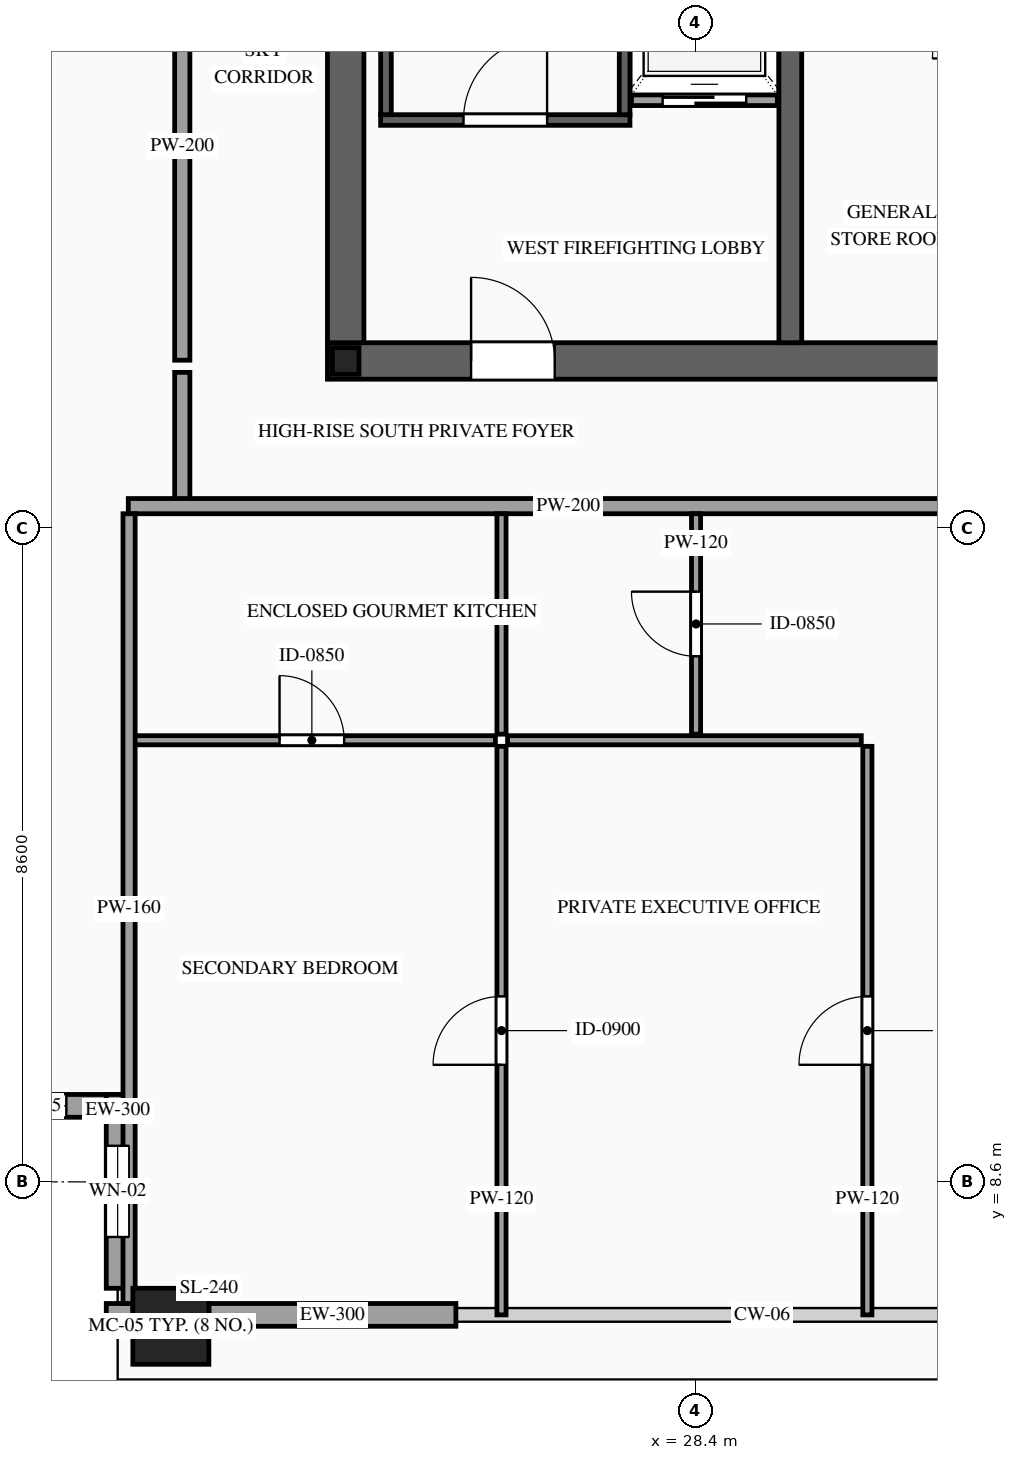
"""IFC4 building model, lengths in metres.
Left out: names, types, materials, properties, quantities, classifications, styles, units other than length and angle.
Written with IfcOpenShell. Run it as: python <this file> out.ifc"""

import sys

from ifc_helpers import new_model, si_unit, direction, frame, frame_2d, origin, origin_2d, place, context, subcontext, project, spatial, rectangle, hollow_rectangle, i_section, extrude, source, transform, mapped, element, fill, save


model = new_model("IFC4")
c1 = context("Model", 3, precision=1e-05, world=origin(), true_north=direction((0.0, 1.0)))
c2 = subcontext(c1, "Body", "Model", "MODEL_VIEW")
j1 = project(units=[si_unit("LENGTHUNIT", "METRE"), si_unit("PLANEANGLEUNIT", "RADIAN")], contexts=[c1])
p1 = place(None, origin())
s1 = spatial("IfcSite", under=j1, at=p1, CompositionType="ELEMENT")
p2 = place(p1, origin())
s2 = spatial("IfcBuilding", under=s1, at=p2, CompositionType="ELEMENT")
p3 = place(p2, frame((0.0, 0.0, 343.2)))
s3 = spatial("IfcBuildingStorey", under=s2, at=p3, CompositionType="ELEMENT", Elevation=343.2)
p4 = place(p3, frame((23.56, 19.4, 0.0), z_axis=(0.0, 0.0, 1.0), x_axis=(1.0, 0.0, 0.0)))
e1 = element("IfcWall", 1, at=p4, inside=s3, PredefinedType="SHEAR", context=c2, shape_type="SweptSolid", body=[
    extrude(rectangle(XDim=26.88, YDim=0.48, at=frame_2d((13.44, 0.0))), origin(), (0.0, 0.0, 1.0), 4.0),
])
p5 = place(p4, frame((1.89, 0.0, 0.0)))
e2 = element("IfcOpeningElement", 2, at=p5, cuts=e1, PredefinedType="OPENING", context=c2, shape_type="SweptSolid", body=[
    extrude(rectangle(XDim=1.1, YDim=2.2, at=frame_2d((0.55, 1.1))), frame((0.0, 0.255, 0.0), z_axis=(0.0, -1.0, 0.0), x_axis=(1.0, 0.0, 0.0)), (0.0, 0.0, 1.0), 0.51),
])
p6 = place(p4, frame((9.79, 0.0, 0.0)))
e3 = element("IfcOpeningElement", 3, at=p6, cuts=e1, PredefinedType="OPENING", context=c2, shape_type="SweptSolid", body=[
    extrude(rectangle(XDim=1.1, YDim=2.2, at=frame_2d((0.55, 1.1))), frame((0.0, 0.255, 0.0), z_axis=(0.0, -1.0, 0.0), x_axis=(1.0, 0.0, 0.0)), (0.0, 0.0, 1.0), 0.51),
])
p7 = place(p4, frame((22.99, 0.0, 0.0)))
e4 = element("IfcOpeningElement", 4, at=p7, cuts=e1, PredefinedType="OPENING", context=c2, shape_type="SweptSolid", body=[
    extrude(rectangle(XDim=1.1, YDim=2.2, at=frame_2d((0.55, 1.1))), frame((0.0, 0.255, 0.0), z_axis=(0.0, -1.0, 0.0), x_axis=(1.0, 0.0, 0.0)), (0.0, 0.0, 1.0), 0.51),
])
p8 = place(p4, frame((19.61, 0.0, 0.0)))
e5 = element("IfcOpeningElement", 5, at=p8, cuts=e1, PredefinedType="OPENING", context=c2, shape_type="SweptSolid", body=[
    extrude(rectangle(XDim=0.9, YDim=2.15, at=frame_2d((0.45, 1.075))), frame((0.0, 0.255, 0.0), z_axis=(0.0, -1.0, 0.0), x_axis=(1.0, 0.0, 0.0)), (0.0, 0.0, 1.0), 0.51),
])
p9 = place(p4, frame((18.17, 0.0, 0.0)))
e6 = element("IfcOpeningElement", 6, at=p9, cuts=e1, PredefinedType="OPENING", context=c2, shape_type="SweptSolid", body=[
    extrude(rectangle(XDim=0.9, YDim=2.15, at=frame_2d((0.45, 1.075))), frame((0.0, 0.255, 0.0), z_axis=(0.0, -1.0, 0.0), x_axis=(1.0, 0.0, 0.0)), (0.0, 0.0, 1.0), 0.51),
])
m1 = source(origin(), c2, "Body", "SweptSolid", [
    extrude(rectangle(XDim=12.32, YDim=0.48, at=frame_2d((6.16, 0.0))), origin(), (0.0, 0.0, 1.0), 4.0),
])
p10 = place(p3, frame((23.8, 19.64, 0.0), z_axis=(0.0, 0.0, 1.0), x_axis=(0.0, 1.0, 0.0)))
e7 = element("IfcWall", 7, at=p10, inside=s3, PredefinedType="SHEAR", context=c2, shape_type="MappedRepresentation", body=[
    mapped(m1, transform((0.0, 0.0, 0.0), scale=1.0)),
])
m2 = source(origin(), c2, "Body", "SweptSolid", [
    extrude(rectangle(XDim=12.32, YDim=0.3, at=frame_2d((6.16, 0.0))), origin(), (0.0, 0.0, 1.0), 4.0),
])
p11 = place(p3, frame((29.65, 19.64, 0.0), z_axis=(0.0, 0.0, 1.0), x_axis=(0.0, 1.0, 0.0)))
e8 = element("IfcWall", 8, at=p11, inside=s3, PredefinedType="SOLIDWALL", context=c2, shape_type="MappedRepresentation", body=[
    mapped(m2, transform((0.0, 0.0, 0.0), scale=1.0)),
])
m3 = source(origin(), c2, "Body", "SweptSolid", [
    extrude(i_section(OverallWidth=0.35, OverallDepth=0.35, WebThickness=0.012, FlangeThickness=0.019, at=origin_2d()), origin(), (0.0, 0.0, 1.0), 4.0),
])
p12 = place(p3, frame((23.8, 19.4, 0.0), z_axis=(0.0, 0.0, 1.0), x_axis=(1.0, 0.0, 0.0)))
e9 = element("IfcColumn", 9, at=p12, inside=s3, PredefinedType="COLUMN", context=c2, shape_type="MappedRepresentation", body=[
    mapped(m3, transform((0.0, 0.0, 0.0), scale=1.0)),
])
m4 = source(origin(), c2, "Body", "SweptSolid", [
    extrude(hollow_rectangle(XDim=1.0, YDim=1.0, WallThickness=0.048, at=origin_2d()), origin(), (0.0, 0.0, 1.0), 4.0),
])
p13 = place(p3, frame((21.5, 6.7, 0.0), z_axis=(0.0, 0.0, 1.0), x_axis=(1.0, 0.0, 0.0)))
e10 = element("IfcColumn", 10, at=p13, inside=s3, PredefinedType="COLUMN", context=c2, shape_type="MappedRepresentation", body=[
    mapped(m4, transform((0.0, 0.0, 0.0), scale=1.0)),
])
p14 = place(p3, frame((18.4, 9.6, 0.0), z_axis=(0.0, 0.0, 1.0), x_axis=(1.0, 0.0, 0.0)))
e11 = element("IfcWall", 11, at=p14, inside=s3, PredefinedType="SOLIDWALL", context=c2, shape_type="SweptSolid", body=[
    extrude(rectangle(XDim=2.55, YDim=0.3, at=frame_2d((1.275, 0.0))), origin(), (0.0, 0.0, 1.0), 3.76),
])
p15 = place(p14, frame((0.825, 0.0, 0.85)))
e12 = element("IfcOpeningElement", 12, at=p15, cuts=e11, PredefinedType="OPENING", context=c2, shape_type="SweptSolid", body=[
    extrude(rectangle(XDim=0.9, YDim=1.5, at=frame_2d((0.45, 0.75))), frame((0.0, 0.165, 0.0), z_axis=(0.0, -1.0, 0.0), x_axis=(1.0, 0.0, 0.0)), (0.0, 0.0, 1.0), 0.33),
])
p16 = place(p3, frame((20.8, 9.75, 0.0), z_axis=(0.0, 0.0, 1.0), x_axis=(0.0, -1.0, 0.0)))
e13 = element("IfcWall", 13, at=p16, inside=s3, PredefinedType="SOLIDWALL", context=c2, shape_type="SweptSolid", body=[
    extrude(rectangle(XDim=2.55, YDim=0.3, at=frame_2d((1.275, 0.0))), origin(), (0.0, 0.0, 1.0), 3.76),
])
p17 = place(p16, frame((0.675, 0.0, 0.85)))
e14 = element("IfcOpeningElement", 14, at=p17, cuts=e13, PredefinedType="OPENING", context=c2, shape_type="SweptSolid", body=[
    extrude(rectangle(XDim=1.2, YDim=2.1, at=frame_2d((0.6, 1.05))), frame((0.0, 0.165, 0.0), z_axis=(0.0, -1.0, 0.0), x_axis=(1.0, 0.0, 0.0)), (0.0, 0.0, 1.0), 0.33),
])
m5 = source(origin(), c2, "Body", "SweptSolid", [
    extrude(rectangle(XDim=0.35, YDim=0.3, at=frame_2d((0.175, 0.0))), origin(), (0.0, 0.0, 1.0), 3.76),
])
p18 = place(p3, frame((20.65, 6.85, 0.0), z_axis=(0.0, 0.0, 1.0), x_axis=(1.0, 0.0, 0.0)))
e15 = element("IfcWall", 15, at=p18, inside=s3, PredefinedType="SOLIDWALL", context=c2, shape_type="MappedRepresentation", body=[
    mapped(m5, transform((0.0, 0.0, 0.0), scale=1.0)),
])
m6 = source(origin(), c2, "Body", "SweptSolid", [
    extrude(rectangle(XDim=3.25, YDim=0.3, at=frame_2d((1.625, 0.0))), origin(), (0.0, 0.0, 1.0), 3.365),
])
p19 = place(p3, frame((22.0, 6.85, 0.0), z_axis=(0.0, 0.0, 1.0), x_axis=(1.0, 0.0, 0.0)))
e16 = element("IfcWall", 16, at=p19, inside=s3, PredefinedType="SOLIDWALL", context=c2, shape_type="MappedRepresentation", body=[
    mapped(m6, transform((0.0, 0.0, 0.0), scale=1.0)),
])
p20 = place(p3, frame((27.56, 22.83, 0.0), z_axis=(0.0, 0.0, 1.0), x_axis=(1.0, 0.0, 0.0)))
e17 = element("IfcWall", 17, at=p20, inside=s3, PredefinedType="SOLIDWALL", context=c2, shape_type="SweptSolid", body=[
    extrude(rectangle(XDim=1.92, YDim=0.14, at=frame_2d((0.96, 0.0))), origin(), (0.0, 0.0, 1.0), 3.76),
])
p21 = place(p20, frame((0.41, 0.0, 0.0)))
e18 = element("IfcOpeningElement", 18, at=p21, cuts=e17, PredefinedType="OPENING", context=c2, shape_type="SweptSolid", body=[
    extrude(rectangle(XDim=1.1, YDim=2.2, at=frame_2d((0.55, 1.1))), frame((0.0, 0.085, 0.0), z_axis=(0.0, -1.0, 0.0), x_axis=(1.0, 0.0, 0.0)), (0.0, 0.0, 1.0), 0.17),
])
p22 = place(p3, frame((24.26, 22.57, 0.0), z_axis=(0.0, 0.0, 1.0), x_axis=(1.0, 0.0, 0.0)))
e19 = element("IfcWall", 19, at=p22, inside=s3, PredefinedType="SOLIDWALL", context=c2, shape_type="SweptSolid", body=[
    extrude(rectangle(XDim=3.28, YDim=0.14, at=frame_2d((1.64, 0.0))), origin(), (0.0, 0.0, 1.0), 3.76),
])
p23 = place(p22, frame((1.09, 0.0, 0.0)))
e20 = element("IfcOpeningElement", 20, at=p23, cuts=e19, PredefinedType="OPENING", context=c2, shape_type="SweptSolid", body=[
    extrude(rectangle(XDim=1.1, YDim=2.2, at=frame_2d((0.55, 1.1))), frame((0.0, 0.085, 0.0), z_axis=(0.0, -1.0, 0.0), x_axis=(1.0, 0.0, 0.0)), (0.0, 0.0, 1.0), 0.17),
])
m7 = source(origin(), c2, "Body", "SweptSolid", [
    extrude(rectangle(XDim=8.94, YDim=0.14, at=frame_2d((4.47, 0.0))), origin(), (0.0, 0.0, 1.0), 3.76),
])
for number, where, z_axis, x_axis in (
    (21, (24.33, 22.64, 0.0), (0.0, 0.0, 1.0), (0.0, 1.0, 0.0)),
    (22, (27.47, 22.64, 0.0), (0.0, 0.0, 1.0), (0.0, 1.0, 0.0)),
):
    element("IfcWall", number, at=place(p3, frame(where, z_axis=z_axis, x_axis=x_axis)), inside=s3, PredefinedType="SOLIDWALL", context=c2, shape_type="MappedRepresentation", body=[
        mapped(m7, transform((0.0, 0.0, 0.0), scale=1.0)),
    ])
m8 = source(origin(), c2, "Body", "SweptSolid", [
    extrude(rectangle(XDim=1.7, YDim=0.2, at=frame_2d((0.85, 0.0))), origin(), (0.0, 0.0, 1.0), 3.76),
])
p24 = place(p3, frame((21.65, 17.55, 0.0), z_axis=(0.0, 0.0, 1.0), x_axis=(0.0, 1.0, 0.0)))
e23 = element("IfcWall", 23, at=p24, inside=s3, PredefinedType="PARTITIONING", context=c2, shape_type="MappedRepresentation", body=[
    mapped(m8, transform((0.0, 0.0, 0.0), scale=1.0)),
])
p25 = place(p3, frame((20.94, 17.49, 0.0), z_axis=(0.0, 0.0, 1.0), x_axis=(1.0, 0.0, 0.0)))
e24 = element("IfcWall", 24, at=p25, inside=s3, PredefinedType="PARTITIONING", context=c2, shape_type="SweptSolid", body=[
    extrude(rectangle(XDim=19.834, YDim=0.2, at=frame_2d((9.917, 0.0))), origin(), (0.0, 0.0, 1.0), 3.76),
])
p26 = place(p25, frame((11.824, 0.0, 0.0)))
e25 = element("IfcOpeningElement", 25, at=p26, cuts=e24, PredefinedType="OPENING", context=c2, shape_type="SweptSolid", body=[
    extrude(rectangle(XDim=1.0, YDim=2.2, at=frame_2d((0.5, 1.1))), frame((0.0, 0.115, 0.0), z_axis=(0.0, -1.0, 0.0), x_axis=(1.0, 0.0, 0.0)), (0.0, 0.0, 1.0), 0.23),
])
p27 = place(p3, frame((20.94, 14.41, 0.0), z_axis=(0.0, 0.0, 1.0), x_axis=(1.0, 0.0, 0.0)))
e26 = element("IfcWall", 26, at=p27, inside=s3, PredefinedType="PARTITIONING", context=c2, shape_type="SweptSolid", body=[
    extrude(rectangle(XDim=4.83, YDim=0.12, at=frame_2d((2.415, 0.0))), origin(), (0.0, 0.0, 1.0), 3.76),
])
p28 = place(p27, frame((1.99, 0.0, 0.0)))
e27 = element("IfcOpeningElement", 27, at=p28, cuts=e26, PredefinedType="OPENING", context=c2, shape_type="SweptSolid", body=[
    extrude(rectangle(XDim=0.85, YDim=2.1, at=frame_2d((0.425, 1.05))), frame((0.0, 0.075, 0.0), z_axis=(0.0, -1.0, 0.0), x_axis=(1.0, 0.0, 0.0)), (0.0, 0.0, 1.0), 0.15),
])
m9 = source(origin(), c2, "Body", "SweptSolid", [
    extrude(rectangle(XDim=2.9, YDim=0.12, at=frame_2d((1.45, 0.0))), origin(), (0.0, 0.0, 1.0), 3.76),
])
p29 = place(p3, frame((25.85, 14.49, 0.0), z_axis=(0.0, 0.0, 1.0), x_axis=(0.0, 1.0, 0.0)))
e28 = element("IfcWall", 28, at=p29, inside=s3, PredefinedType="PARTITIONING", context=c2, shape_type="MappedRepresentation", body=[
    mapped(m9, transform((0.0, 0.0, 0.0), scale=1.0)),
])
p30 = place(p3, frame((28.41, 14.49, 0.0), z_axis=(0.0, 0.0, 1.0), x_axis=(0.0, 1.0, 0.0)))
e29 = element("IfcWall", 29, at=p30, inside=s3, PredefinedType="PARTITIONING", context=c2, shape_type="SweptSolid", body=[
    extrude(rectangle(XDim=2.9, YDim=0.12, at=frame_2d((1.45, 0.0))), origin(), (0.0, 0.0, 1.0), 3.76),
])
p31 = place(p30, frame((1.025, 0.0, 0.0)))
e30 = element("IfcOpeningElement", 30, at=p31, cuts=e29, PredefinedType="OPENING", context=c2, shape_type="SweptSolid", body=[
    extrude(rectangle(XDim=0.85, YDim=2.1, at=frame_2d((0.425, 1.05))), frame((0.0, 0.075, 0.0), z_axis=(0.0, -1.0, 0.0), x_axis=(1.0, 0.0, 0.0)), (0.0, 0.0, 1.0), 0.15),
])
p32 = place(p3, frame((25.85, 6.85, 0.0), z_axis=(0.0, 0.0, 1.0), x_axis=(0.0, 1.0, 0.0)))
e31 = element("IfcWall", 31, at=p32, inside=s3, PredefinedType="PARTITIONING", context=c2, shape_type="SweptSolid", body=[
    extrude(rectangle(XDim=7.48, YDim=0.12, at=frame_2d((3.74, 0.0))), origin(), (0.0, 0.0, 1.0), 3.76),
])
p33 = place(p32, frame((3.29, 0.0, 0.0)))
e32 = element("IfcOpeningElement", 32, at=p33, cuts=e31, PredefinedType="OPENING", context=c2, shape_type="SweptSolid", body=[
    extrude(rectangle(XDim=0.9, YDim=2.15, at=frame_2d((0.45, 1.075))), frame((0.0, 0.075, 0.0), z_axis=(0.0, -1.0, 0.0), x_axis=(1.0, 0.0, 0.0)), (0.0, 0.0, 1.0), 0.15),
])
m10 = source(origin(), c2, "Body", "SweptSolid", [
    extrude(rectangle(XDim=4.654, YDim=0.12, at=frame_2d((2.327, 0.0))), origin(), (0.0, 0.0, 1.0), 3.76),
])
p34 = place(p3, frame((25.93, 14.41, 0.0), z_axis=(0.0, 0.0, 1.0), x_axis=(1.0, 0.0, 0.0)))
e33 = element("IfcWall", 33, at=p34, inside=s3, PredefinedType="PARTITIONING", context=c2, shape_type="MappedRepresentation", body=[
    mapped(m10, transform((0.0, 0.0, 0.0), scale=1.0)),
])
p35 = place(p3, frame((30.664, 6.85, 0.0), z_axis=(0.0, 0.0, 1.0), x_axis=(0.0, 1.0, 0.0)))
e34 = element("IfcWall", 34, at=p35, inside=s3, PredefinedType="PARTITIONING", context=c2, shape_type="SweptSolid", body=[
    extrude(rectangle(XDim=7.48, YDim=0.12, at=frame_2d((3.74, 0.0))), origin(), (0.0, 0.0, 1.0), 3.76),
])
p36 = place(p35, frame((3.29, 0.0, 0.0)))
e35 = element("IfcOpeningElement", 35, at=p36, cuts=e34, PredefinedType="OPENING", context=c2, shape_type="SweptSolid", body=[
    extrude(rectangle(XDim=0.9, YDim=2.15, at=frame_2d((0.45, 1.075))), frame((0.0, 0.075, 0.0), z_axis=(0.0, -1.0, 0.0), x_axis=(1.0, 0.0, 0.0)), (0.0, 0.0, 1.0), 0.15),
])
m11 = source(origin(), c2, "Body", "SweptSolid", [
    extrude(rectangle(XDim=10.39, YDim=0.16, at=frame_2d((5.195, 0.0))), origin(), (0.0, 0.0, 1.0), 3.76),
])
p37 = place(p3, frame((20.95, 7.0, 0.0), z_axis=(0.0, 0.0, 1.0), x_axis=(0.0, 1.0, 0.0)))
e36 = element("IfcWall", 36, at=p37, inside=s3, PredefinedType="PARTITIONING", context=c2, shape_type="MappedRepresentation", body=[
    mapped(m11, transform((0.0, 0.0, 0.0), scale=1.0)),
])
p38 = place(p3, frame((21.65, 19.41, 0.0), z_axis=(0.0, 0.0, 1.0), x_axis=(0.0, 1.0, 0.0)))
e37 = element("IfcWall", 37, at=p38, inside=s3, PredefinedType="PARTITIONING", context=c2, shape_type="SweptSolid", body=[
    extrude(rectangle(XDim=12.78, YDim=0.2, at=frame_2d((6.39, 0.0))), origin(), (0.0, 0.0, 1.0), 3.76),
])
p39 = place(p38, frame((5.89, 0.0, 0.0)))
e38 = element("IfcOpeningElement", 38, at=p39, cuts=e37, PredefinedType="OPENING", context=c2, shape_type="SweptSolid", body=[
    extrude(rectangle(XDim=1.0, YDim=2.2, at=frame_2d((0.5, 1.1))), frame((0.0, 0.115, 0.0), z_axis=(0.0, -1.0, 0.0), x_axis=(1.0, 0.0, 0.0)), (0.0, 0.0, 1.0), 0.23),
])
m12 = source(origin(), c2, "Body", "SweptSolid", [
    extrude(rectangle(XDim=0.9, YDim=1.5, at=frame_2d((0.45, 0.75))), frame((0.0, 0.03, 0.0), z_axis=(0.0, -1.0, 0.0), x_axis=(1.0, 0.0, 0.0)), (0.0, 0.0, 1.0), 0.06),
])
p40 = place(p15, origin())
e39 = element("IfcWindow", 39, at=p40, inside=s3, PartitioningType="SINGLE_PANEL", PredefinedType="WINDOW", context=c2, shape_type="MappedRepresentation", body=[
    mapped(m12, transform((0.0, 0.0, 0.0), scale=1.0)),
])
fill(e12, e39)
m13 = source(origin(), c2, "Body", "SweptSolid", [
    extrude(rectangle(XDim=1.2, YDim=2.1, at=frame_2d((0.6, 1.05))), frame((0.0, 0.03, 0.0), z_axis=(0.0, -1.0, 0.0), x_axis=(1.0, 0.0, 0.0)), (0.0, 0.0, 1.0), 0.06),
])
p41 = place(p17, origin())
e40 = element("IfcWindow", 40, at=p41, inside=s3, PartitioningType="SINGLE_PANEL", PredefinedType="WINDOW", context=c2, shape_type="MappedRepresentation", body=[
    mapped(m13, transform((0.0, 0.0, 0.0), scale=1.0)),
])
fill(e14, e40)
m14 = source(origin(), c2, "Body", "SweptSolid", [
    extrude(rectangle(XDim=1.1, YDim=2.2, at=frame_2d((0.55, 1.1))), frame((0.0, 0.025, 0.0), z_axis=(0.0, -1.0, 0.0), x_axis=(1.0, 0.0, 0.0)), (0.0, 0.0, 1.0), 0.05),
])
p42 = place(p21, origin())
e41 = element("IfcDoor", 41, at=p42, inside=s3, OperationType="SLIDING_TO_LEFT", PredefinedType="DOOR", context=c2, shape_type="MappedRepresentation", body=[
    mapped(m14, transform((0.0, 0.0, 0.0), scale=1.0)),
])
fill(e18, e41)
m15 = source(origin(), c2, "Body", "SweptSolid", [
    extrude(rectangle(XDim=1.1, YDim=2.2, at=frame_2d((0.55, 1.1))), frame((0.0, 0.025, 0.0), z_axis=(0.0, -1.0, 0.0), x_axis=(1.0, 0.0, 0.0)), (0.0, 0.0, 1.0), 0.05),
])
p43 = place(p23, origin())
e42 = element("IfcDoor", 42, at=p43, inside=s3, OperationType="SINGLE_SWING_RIGHT", PredefinedType="DOOR", context=c2, shape_type="MappedRepresentation", body=[
    mapped(m15, transform((0.0, 0.0, 0.0), scale=1.0)),
])
fill(e20, e42)
p44 = place(p5, origin())
e43 = element("IfcDoor", 43, at=p44, inside=s3, OperationType="SINGLE_SWING_LEFT", PredefinedType="DOOR", context=c2, shape_type="MappedRepresentation", body=[
    mapped(m15, transform((0.0, 0.0, 0.0), scale=1.0)),
])
fill(e2, e43)
m16 = source(origin(), c2, "Body", "SweptSolid", [
    extrude(rectangle(XDim=0.85, YDim=2.1, at=frame_2d((0.425, 1.05))), frame((0.0, 0.025, 0.0), z_axis=(0.0, -1.0, 0.0), x_axis=(1.0, 0.0, 0.0)), (0.0, 0.0, 1.0), 0.05),
])
p45 = place(p28, origin())
e44 = element("IfcDoor", 44, at=p45, inside=s3, OperationType="SINGLE_SWING_LEFT", PredefinedType="DOOR", context=c2, shape_type="MappedRepresentation", body=[
    mapped(m16, transform((0.0, 0.0, 0.0), scale=1.0)),
])
fill(e27, e44)
p46 = place(p31, origin())
e45 = element("IfcDoor", 45, at=p46, inside=s3, OperationType="SINGLE_SWING_RIGHT", PredefinedType="DOOR", context=c2, shape_type="MappedRepresentation", body=[
    mapped(m16, transform((0.0, 0.0, 0.0), scale=1.0)),
])
fill(e30, e45)
m17 = source(origin(), c2, "Body", "SweptSolid", [
    extrude(rectangle(XDim=0.9, YDim=2.15, at=frame_2d((0.45, 1.075))), frame((0.0, 0.025, 0.0), z_axis=(0.0, -1.0, 0.0), x_axis=(1.0, 0.0, 0.0)), (0.0, 0.0, 1.0), 0.05),
])
p47 = place(p33, origin())
e46 = element("IfcDoor", 46, at=p47, inside=s3, OperationType="SINGLE_SWING_LEFT", PredefinedType="DOOR", context=c2, shape_type="MappedRepresentation", body=[
    mapped(m17, transform((0.0, 0.0, 0.0), scale=1.0)),
])
fill(e32, e46)
p48 = place(p36, origin())
e47 = element("IfcDoor", 47, at=p48, inside=s3, OperationType="SINGLE_SWING_LEFT", PredefinedType="DOOR", context=c2, shape_type="MappedRepresentation", body=[
    mapped(m17, transform((0.0, 0.0, 0.0), scale=1.0)),
])
fill(e35, e47)
save(model, sys.argv[1])
